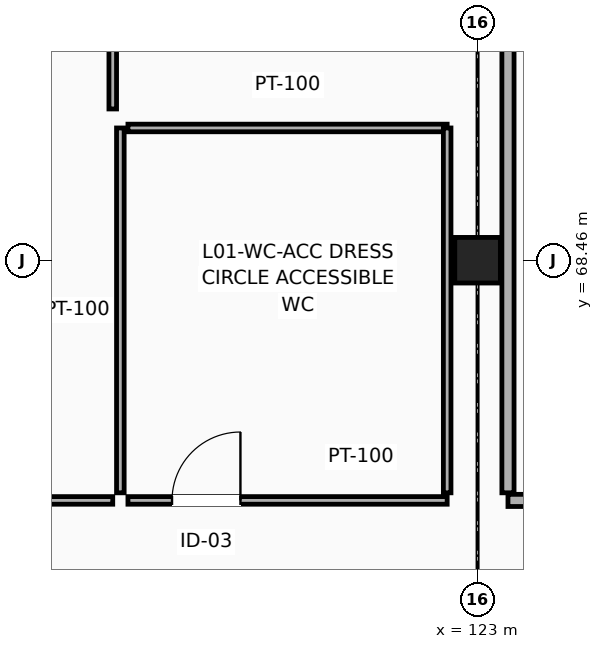
"""IFC4 building model, lengths in metres.
Left out: names, types, materials, properties, quantities, classifications, styles, units other than length and angle.
Written with IfcOpenShell. Run it as: python <this file> out.ifc"""

import sys

from ifc_helpers import new_model, si_unit, direction, frame, frame_2d, origin, origin_2d, place, context, subcontext, project, spatial, rectangle, extrude, element, fill, save


model = new_model("IFC4")
c1 = context("Model", 3, precision=1e-05, world=origin(), true_north=direction((0.0, 1.0)))
c2 = subcontext(c1, "Body", "Model", "MODEL_VIEW")
j1 = project(units=[si_unit("LENGTHUNIT", "METRE"), si_unit("PLANEANGLEUNIT", "RADIAN")], contexts=[c1])
p1 = place(None, origin())
s1 = spatial("IfcSite", under=j1, at=p1, CompositionType="ELEMENT")
p2 = place(p1, origin())
s2 = spatial("IfcBuilding", under=s1, at=p2, CompositionType="ELEMENT")
p3 = place(p2, frame((0.0, 0.0, 5.4)))
s3 = spatial("IfcBuildingStorey", under=s2, at=p3, CompositionType="ELEMENT", Elevation=5.4)
p4 = place(p3, frame((123.0, 68.46, 0.0), z_axis=(0.0, 0.0, 1.0), x_axis=(1.0, 0.0, 0.0)))
e1 = element("IfcColumn", 1, at=p4, inside=s3, PredefinedType="COLUMN", context=c2, shape_type="SweptSolid", body=[
    extrude(rectangle(XDim=0.6, YDim=0.6, at=origin_2d()), origin(), (0.0, 0.0, 1.0), 4.8),
])
p5 = place(p3, frame((110.6, 65.3, 0.0), z_axis=(0.0, 0.0, 1.0), x_axis=(1.0, 0.0, 0.0)))
e2 = element("IfcWall", 2, at=p5, inside=s3, PredefinedType="PARTITIONING", context=c2, shape_type="SweptSolid", body=[
    extrude(rectangle(XDim=7.6, YDim=0.1, at=frame_2d((3.8, 0.0))), origin(), (0.0, 0.0, 1.0), 4.157),
])
p6 = place(p5, frame((0.58, 0.0, 0.0)))
e3 = element("IfcOpeningElement", 3, at=p6, cuts=e2, PredefinedType="OPENING", context=c2, shape_type="SweptSolid", body=[
    extrude(rectangle(XDim=0.9, YDim=2.1, at=frame_2d((0.45, 1.05))), frame((0.0, 0.06, 0.0), z_axis=(0.0, -1.0, 0.0), x_axis=(1.0, 0.0, 0.0)), (0.0, 0.0, 1.0), 0.12),
])
p7 = place(p3, frame((118.4, 65.3, 0.0), z_axis=(0.0, 0.0, 1.0), x_axis=(1.0, 0.0, 0.0)))
e4 = element("IfcWall", 4, at=p7, inside=s3, PredefinedType="PARTITIONING", context=c2, shape_type="SweptSolid", body=[
    extrude(rectangle(XDim=4.2, YDim=0.1, at=frame_2d((2.1, 0.0))), origin(), (0.0, 0.0, 1.0), 4.127),
])
p8 = place(p7, frame((0.58, 0.0, 0.0)))
e5 = element("IfcOpeningElement", 5, at=p8, cuts=e4, PredefinedType="OPENING", context=c2, shape_type="SweptSolid", body=[
    extrude(rectangle(XDim=0.9, YDim=2.1, at=frame_2d((0.45, 1.05))), frame((0.0, 0.06, 0.0), z_axis=(0.0, -1.0, 0.0), x_axis=(1.0, 0.0, 0.0)), (0.0, 0.0, 1.0), 0.12),
])
p9 = place(p3, frame((123.4, 65.3, 0.0), z_axis=(0.0, 0.0, 1.0), x_axis=(1.0, 0.0, 0.0)))
e6 = element("IfcWall", 6, at=p9, inside=s3, PredefinedType="PARTITIONING", context=c2, shape_type="SweptSolid", body=[
    extrude(rectangle(XDim=39.84, YDim=0.16, at=frame_2d((19.92, 0.0))), origin(), (0.0, 0.0, 1.0), 3.887),
])
p10 = place(p9, frame((2.976, 0.0, 0.0)))
e7 = element("IfcOpeningElement", 7, at=p10, cuts=e6, PredefinedType="OPENING", context=c2, shape_type="SweptSolid", body=[
    extrude(rectangle(XDim=1.35, YDim=2.2, at=frame_2d((0.675, 1.1))), frame((0.0, 0.09, 0.0), z_axis=(0.0, -1.0, 0.0), x_axis=(1.0, 0.0, 0.0)), (0.0, 0.0, 1.0), 0.18),
])
p11 = place(p3, frame((118.3, 65.4, 0.0), z_axis=(0.0, 0.0, 1.0), x_axis=(0.0, 1.0, 0.0)))
e8 = element("IfcWall", 8, at=p11, inside=s3, PredefinedType="PARTITIONING", context=c2, shape_type="SweptSolid", body=[
    extrude(rectangle(XDim=4.8, YDim=0.1, at=frame_2d((2.4, 0.0))), origin(), (0.0, 0.0, 1.0), 3.987),
])
p12 = place(p3, frame((118.2, 70.45, 0.0), z_axis=(0.0, 0.0, 1.0), x_axis=(0.0, 1.0, 0.0)))
e9 = element("IfcWall", 9, at=p12, inside=s3, PredefinedType="PARTITIONING", context=c2, shape_type="SweptSolid", body=[
    extrude(rectangle(XDim=12.35, YDim=0.1, at=frame_2d((6.175, 0.0))), origin(), (0.0, 0.0, 1.0), 3.987),
])
p13 = place(p3, frame((118.4, 70.2, 0.0), z_axis=(0.0, 0.0, 1.0), x_axis=(1.0, 0.0, 0.0)))
e10 = element("IfcWall", 10, at=p13, inside=s3, PredefinedType="PARTITIONING", context=c2, shape_type="SweptSolid", body=[
    extrude(rectangle(XDim=4.2, YDim=0.1, at=frame_2d((2.1, 0.0))), origin(), (0.0, 0.0, 1.0), 4.087),
])
p14 = place(p3, frame((122.6, 65.4, 0.0), z_axis=(0.0, 0.0, 1.0), x_axis=(0.0, 1.0, 0.0)))
e11 = element("IfcWall", 11, at=p14, inside=s3, PredefinedType="PARTITIONING", context=c2, shape_type="SweptSolid", body=[
    extrude(rectangle(XDim=4.8, YDim=0.1, at=frame_2d((2.4, 0.0))), origin(), (0.0, 0.0, 1.0), 3.987),
])
p15 = place(p3, frame((123.4, 65.4, 0.0), z_axis=(0.0, 0.0, 1.0), x_axis=(0.0, 1.0, 0.0)))
e12 = element("IfcWall", 12, at=p15, inside=s3, PredefinedType="PARTITIONING", context=c2, shape_type="SweptSolid", body=[
    extrude(rectangle(XDim=17.4, YDim=0.16, at=frame_2d((8.7, 0.0))), origin(), (0.0, 0.0, 1.0), 3.687),
])
p16 = place(p8, origin())
e13 = element("IfcDoor", 13, at=p16, inside=s3, OperationType="SINGLE_SWING_RIGHT", PredefinedType="DOOR", context=c2, shape_type="SweptSolid", body=[
    extrude(rectangle(XDim=0.9, YDim=2.1, at=frame_2d((0.45, 1.05))), frame((0.0, 0.025, 0.0), z_axis=(0.0, -1.0, 0.0), x_axis=(1.0, 0.0, 0.0)), (0.0, 0.0, 1.0), 0.05),
])
fill(e5, e13)
save(model, sys.argv[1])
